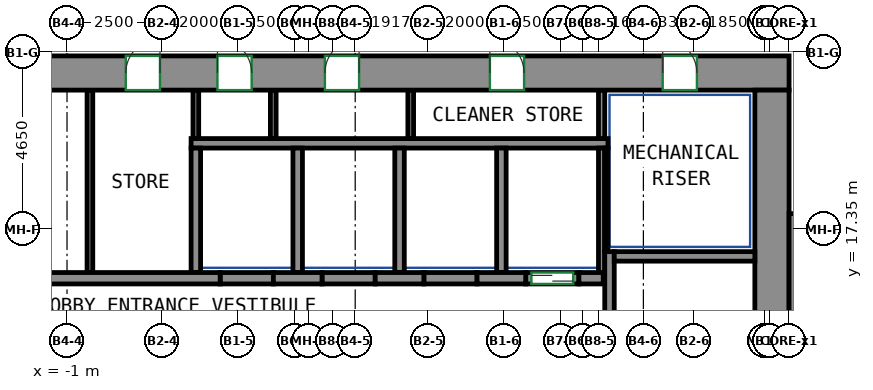
"""IFC4 building model, lengths in metres.
Left out: names, types, materials, properties, quantities, classifications, styles, units other than length and angle.
Written with IfcOpenShell. Run it as: python <this file> out.ifc"""

import sys

from ifc_helpers import new_model, si_unit, direction, frame, frame_2d, origin, place, context, subcontext, project, spatial, rectangle, extrude, source, transform, mapped, element, fill, save


model = new_model("IFC4")
c1 = context("Model", 3, precision=1e-05, world=origin(), true_north=direction((0.0, 1.0)))
c2 = subcontext(c1, "Body", "Model", "MODEL_VIEW")
j1 = project(units=[si_unit("LENGTHUNIT", "METRE"), si_unit("PLANEANGLEUNIT", "RADIAN")], contexts=[c1])
p1 = place(None, origin())
s1 = spatial("IfcSite", under=j1, at=p1, CompositionType="ELEMENT")
p2 = place(p1, origin())
s2 = spatial("IfcBuilding", under=s1, at=p2, CompositionType="ELEMENT")
p3 = place(p2, frame((0.0, 0.0, 171.9)))
s3 = spatial("IfcBuildingStorey", under=s2, at=p3, CompositionType="ELEMENT", Elevation=171.9)
m1 = source(origin(), c2, "Body", "SweptSolid", [
    extrude(rectangle(XDim=33.9, YDim=0.9, at=frame_2d((16.95, 0.0))), origin(), (0.0, 0.0, 1.0), 3.12),
])
p4 = place(p3, frame((-15.9, 21.45, 0.0), z_axis=(0.0, 0.0, 1.0), x_axis=(1.0, 0.0, 0.0)))
e1 = element("IfcWall", 1, at=p4, inside=s3, PredefinedType="SHEAR", context=c2, shape_type="MappedRepresentation", body=[
    mapped(m1, transform((0.0, 0.0, 0.0))),
])
p5 = place(p4, frame((6.731, 0.0, 0.0)))
e2 = element("IfcOpeningElement", 2, at=p5, cuts=e1, PredefinedType="OPENING", context=c2, shape_type="SweptSolid", body=[
    extrude(rectangle(XDim=0.9, YDim=2.1, at=frame_2d((0.45, 1.05))), frame((0.0, 0.46, 0.0), z_axis=(0.0, -1.0, 0.0), x_axis=(1.0, 0.0, 0.0)), (0.0, 0.0, 1.0), 0.92),
])
p6 = place(p4, frame((12.038, 0.0, 0.0)))
e3 = element("IfcOpeningElement", 3, at=p6, cuts=e1, PredefinedType="OPENING", context=c2, shape_type="SweptSolid", body=[
    extrude(rectangle(XDim=0.9, YDim=2.1, at=frame_2d((0.45, 1.05))), frame((0.0, 0.46, 0.0), z_axis=(0.0, -1.0, 0.0), x_axis=(1.0, 0.0, 0.0)), (0.0, 0.0, 1.0), 0.92),
])
p7 = place(p4, frame((16.446, 0.0, 0.0)))
e4 = element("IfcOpeningElement", 4, at=p7, cuts=e1, PredefinedType="OPENING", context=c2, shape_type="SweptSolid", body=[
    extrude(rectangle(XDim=0.9, YDim=2.1, at=frame_2d((0.45, 1.05))), frame((0.0, 0.46, 0.0), z_axis=(0.0, -1.0, 0.0), x_axis=(1.0, 0.0, 0.0)), (0.0, 0.0, 1.0), 0.92),
])
p8 = place(p4, frame((18.858, 0.0, 0.0)))
e5 = element("IfcOpeningElement", 5, at=p8, cuts=e1, PredefinedType="OPENING", context=c2, shape_type="SweptSolid", body=[
    extrude(rectangle(XDim=0.9, YDim=2.1, at=frame_2d((0.45, 1.05))), frame((0.0, 0.46, 0.0), z_axis=(0.0, -1.0, 0.0), x_axis=(1.0, 0.0, 0.0)), (0.0, 0.0, 1.0), 0.92),
])
p9 = place(p4, frame((21.686, 0.0, 0.0)))
e6 = element("IfcOpeningElement", 6, at=p9, cuts=e1, PredefinedType="OPENING", context=c2, shape_type="SweptSolid", body=[
    extrude(rectangle(XDim=0.9, YDim=2.1, at=frame_2d((0.45, 1.05))), frame((0.0, 0.46, 0.0), z_axis=(0.0, -1.0, 0.0), x_axis=(1.0, 0.0, 0.0)), (0.0, 0.0, 1.0), 0.92),
])
p10 = place(p4, frame((26.027, 0.0, 0.0)))
e7 = element("IfcOpeningElement", 7, at=p10, cuts=e1, PredefinedType="OPENING", context=c2, shape_type="SweptSolid", body=[
    extrude(rectangle(XDim=0.9, YDim=2.1, at=frame_2d((0.45, 1.05))), frame((0.0, 0.46, 0.0), z_axis=(0.0, -1.0, 0.0), x_axis=(1.0, 0.0, 0.0)), (0.0, 0.0, 1.0), 0.92),
])
p11 = place(p4, frame((2.425, 0.0, 0.0)))
e8 = element("IfcOpeningElement", 8, at=p11, cuts=e1, PredefinedType="OPENING", context=c2, shape_type="SweptSolid", body=[
    extrude(rectangle(XDim=0.9, YDim=2.1, at=frame_2d((0.45, 1.05))), frame((0.0, 0.46, 0.0), z_axis=(0.0, -1.0, 0.0), x_axis=(1.0, 0.0, 0.0)), (0.0, 0.0, 1.0), 0.92),
])
p12 = place(p4, frame((30.575, 0.0, 0.0)))
e9 = element("IfcOpeningElement", 9, at=p12, cuts=e1, PredefinedType="OPENING", context=c2, shape_type="SweptSolid", body=[
    extrude(rectangle(XDim=0.9, YDim=2.1, at=frame_2d((0.45, 1.05))), frame((0.0, 0.46, 0.0), z_axis=(0.0, -1.0, 0.0), x_axis=(1.0, 0.0, 0.0)), (0.0, 0.0, 1.0), 0.92),
])
m2 = source(origin(), c2, "Body", "SweptSolid", [
    extrude(rectangle(XDim=12.0, YDim=0.9, at=frame_2d((6.0, 0.0))), origin(), (0.0, 0.0, 1.0), 3.12),
])
p13 = place(p3, frame((17.55, 9.0, 0.0), z_axis=(0.0, 0.0, 1.0), x_axis=(0.0, 1.0, 0.0)))
e10 = element("IfcWall", 10, at=p13, inside=s3, PredefinedType="SHEAR", context=c2, shape_type="MappedRepresentation", body=[
    mapped(m2, transform((0.0, 0.0, 0.0))),
])
m3 = source(origin(), c2, "Body", "SweptSolid", [
    extrude(rectangle(XDim=7.75, YDim=0.25, at=frame_2d((3.875, 0.0))), origin(), (0.0, 0.0, 1.0), 3.12),
])
p14 = place(p3, frame((13.275, 9.0, 0.0), z_axis=(0.0, 0.0, 1.0), x_axis=(0.0, 1.0, 0.0)))
e11 = element("IfcWall", 11, at=p14, inside=s3, PredefinedType="SHEAR", context=c2, shape_type="MappedRepresentation", body=[
    mapped(m3, transform((0.0, 0.0, 0.0))),
])
m4 = source(origin(), c2, "Body", "SweptSolid", [
    extrude(rectangle(XDim=3.7, YDim=0.25, at=frame_2d((1.85, 0.0))), origin(), (0.0, 0.0, 1.0), 3.12),
])
p15 = place(p3, frame((13.4, 16.625, 0.0), z_axis=(0.0, 0.0, 1.0), x_axis=(1.0, 0.0, 0.0)))
e12 = element("IfcWall", 12, at=p15, inside=s3, PredefinedType="SHEAR", context=c2, shape_type="MappedRepresentation", body=[
    mapped(m4, transform((0.0, 0.0, 0.0))),
])
m5 = source(origin(), c2, "Body", "SweptSolid", [
    extrude(rectangle(XDim=8.0, YDim=0.35, at=frame_2d((4.0, 0.0))), origin(), (0.0, 0.0, 1.0), 3.12),
])
p16 = place(p3, frame((18.175, 9.75, 0.0), z_axis=(0.0, 0.0, 1.0), x_axis=(0.0, 1.0, 0.0)))
e13 = element("IfcWall", 13, at=p16, inside=s3, PredefinedType="SHEAR", context=c2, shape_type="MappedRepresentation", body=[
    mapped(m5, transform((0.0, 0.0, 0.0))),
])
m6 = source(origin(), c2, "Body", "SweptSolid", [
    extrude(rectangle(XDim=14.04, YDim=0.3, at=frame_2d((7.02, 0.0))), origin(), (0.0, 0.0, 1.0), 3.12),
])
p17 = place(p3, frame((-11.01, 16.05, 0.0), z_axis=(0.0, 0.0, 1.0), x_axis=(1.0, 0.0, 0.0)))
e14 = element("IfcWall", 14, at=p17, inside=s3, PredefinedType="SHEAR", context=c2, shape_type="MappedRepresentation", body=[
    mapped(m6, transform((0.0, 0.0, 0.0))),
])
m7 = source(origin(), c2, "Body", "SweptSolid", [
    extrude(rectangle(XDim=1.28, YDim=0.3, at=frame_2d((0.64, 0.0))), origin(), (0.0, 0.0, 1.0), 3.12),
])
p18 = place(p3, frame((4.43, 16.05, 0.0), z_axis=(0.0, 0.0, 1.0), x_axis=(1.0, 0.0, 0.0)))
e15 = element("IfcWall", 15, at=p18, inside=s3, PredefinedType="SHEAR", context=c2, shape_type="MappedRepresentation", body=[
    mapped(m7, transform((0.0, 0.0, 0.0))),
])
m8 = source(origin(), c2, "Body", "SweptSolid", [
    extrude(rectangle(XDim=1.28, YDim=0.3, at=frame_2d((0.64, 0.0))), origin(), (0.0, 0.0, 1.0), 3.12),
])
p19 = place(p3, frame((7.11, 16.05, 0.0), z_axis=(0.0, 0.0, 1.0), x_axis=(1.0, 0.0, 0.0)))
e16 = element("IfcWall", 16, at=p19, inside=s3, PredefinedType="SHEAR", context=c2, shape_type="MappedRepresentation", body=[
    mapped(m8, transform((0.0, 0.0, 0.0))),
])
p20 = place(p3, frame((9.79, 16.05, 0.0), z_axis=(0.0, 0.0, 1.0), x_axis=(1.0, 0.0, 0.0)))
e17 = element("IfcWall", 17, at=p20, inside=s3, PredefinedType="SHEAR", context=c2, shape_type="MappedRepresentation", body=[
    mapped(m7, transform((0.0, 0.0, 0.0))),
])
m9 = source(origin(), c2, "Body", "SweptSolid", [
    extrude(rectangle(XDim=0.64, YDim=0.3, at=frame_2d((0.32, 0.0))), origin(), (0.0, 0.0, 1.0), 3.12),
])
p21 = place(p3, frame((12.47, 16.05, 0.0), z_axis=(0.0, 0.0, 1.0), x_axis=(1.0, 0.0, 0.0)))
e18 = element("IfcWall", 18, at=p21, inside=s3, PredefinedType="SHEAR", context=c2, shape_type="MappedRepresentation", body=[
    mapped(m9, transform((0.0, 0.0, 0.0))),
])
m10 = source(origin(), c2, "Body", "SweptSolid", [
    extrude(rectangle(XDim=1.4, YDim=0.3, at=frame_2d((0.7, 0.0))), origin(), (0.0, 0.0, 1.0), 3.12),
])
p22 = place(p3, frame((11.07, 16.05, 0.0), z_axis=(0.0, 0.0, 1.0), x_axis=(1.0, 0.0, 0.0)))
e19 = element("IfcWall", 19, at=p22, inside=s3, PredefinedType="PARTITIONING", context=c2, shape_type="MappedRepresentation", body=[
    mapped(m10, transform((0.0, 0.0, 0.0))),
])
p23 = place(p22, frame((0.15, 0.0, 0.0)))
e20 = element("IfcOpeningElement", 20, at=p23, cuts=e19, PredefinedType="OPENING", context=c2, shape_type="SweptSolid", body=[
    extrude(rectangle(XDim=1.1, YDim=2.1, at=frame_2d((0.55, 1.05))), frame((0.0, 0.16, 0.0), z_axis=(0.0, -1.0, 0.0), x_axis=(1.0, 0.0, 0.0)), (0.0, 0.0, 1.0), 0.32),
])
p24 = place(p3, frame((3.03, 16.05, 0.0), z_axis=(0.0, 0.0, 1.0), x_axis=(1.0, 0.0, 0.0)))
e21 = element("IfcWall", 21, at=p24, inside=s3, PredefinedType="PARTITIONING", context=c2, shape_type="MappedRepresentation", body=[
    mapped(m10, transform((0.0, 0.0, 0.0))),
])
m11 = source(origin(), c2, "Body", "SweptSolid", [
    extrude(rectangle(XDim=1.4, YDim=0.3, at=frame_2d((0.7, 0.0))), origin(), (0.0, 0.0, 1.0), 3.12),
])
for number, where, z_axis, x_axis in (
    (22, (5.71, 16.05, 0.0), (0.0, 0.0, 1.0), (1.0, 0.0, 0.0)),
    (23, (8.39, 16.05, 0.0), (0.0, 0.0, 1.0), (1.0, 0.0, 0.0)),
):
    element("IfcWall", number, at=place(p3, frame(where, z_axis=z_axis, x_axis=x_axis)), inside=s3, PredefinedType="PARTITIONING", context=c2, shape_type="MappedRepresentation", body=[
        mapped(m11, transform((0.0, 0.0, 0.0))),
    ])
m12 = source(origin(), c2, "Body", "SweptSolid", [
    extrude(rectangle(XDim=10.97, YDim=0.25, at=frame_2d((5.485, 0.0))), origin(), (0.0, 0.0, 1.0), 3.12),
])
p25 = place(p3, frame((2.265, 19.6, 0.0), z_axis=(0.0, 0.0, 1.0), x_axis=(1.0, 0.0, 0.0)))
e24 = element("IfcWall", 24, at=p25, inside=s3, PredefinedType="PARTITIONING", context=c2, shape_type="MappedRepresentation", body=[
    mapped(m12, transform((0.0, 0.0, 0.0))),
])
m13 = source(origin(), c2, "Body", "SweptSolid", [
    extrude(rectangle(XDim=3.275, YDim=0.165, at=frame_2d((1.638, 0.0))), origin(), (0.0, 0.0, 1.0), 3.12),
])
p26 = place(p3, frame((13.067, 16.2, 0.0), z_axis=(0.0, 0.0, 1.0), x_axis=(0.0, 1.0, 0.0)))
e25 = element("IfcWall", 25, at=p26, inside=s3, PredefinedType="PARTITIONING", context=c2, shape_type="MappedRepresentation", body=[
    mapped(m13, transform((0.0, 0.0, 0.0))),
])
m14 = source(origin(), c2, "Body", "SweptSolid", [
    extrude(rectangle(XDim=1.275, YDim=0.165, at=frame_2d((0.637, 0.0))), origin(), (0.0, 0.0, 1.0), 3.12),
])
p27 = place(p3, frame((13.067, 19.725, 0.0), z_axis=(0.0, 0.0, 1.0), x_axis=(0.0, 1.0, 0.0)))
e26 = element("IfcWall", 26, at=p27, inside=s3, PredefinedType="PARTITIONING", context=c2, shape_type="MappedRepresentation", body=[
    mapped(m14, transform((0.0, 0.0, 0.0))),
])
m15 = source(origin(), c2, "Body", "SweptSolid", [
    extrude(rectangle(XDim=3.275, YDim=0.25, at=frame_2d((1.638, 0.0))), origin(), (0.0, 0.0, 1.0), 3.12),
])
p28 = place(p3, frame((10.43, 16.2, 0.0), z_axis=(0.0, 0.0, 1.0), x_axis=(0.0, 1.0, 0.0)))
e27 = element("IfcWall", 27, at=p28, inside=s3, PredefinedType="PARTITIONING", context=c2, shape_type="MappedRepresentation", body=[
    mapped(m15, transform((0.0, 0.0, 0.0))),
])
m16 = source(origin(), c2, "Body", "SweptSolid", [
    extrude(rectangle(XDim=2.725, YDim=0.085, at=frame_2d((1.363, 0.0))), origin(), (0.0, 0.0, 1.0), 3.12),
])
p29 = place(p3, frame((13.192, 16.75, 0.0), z_axis=(0.0, 0.0, 1.0), x_axis=(0.0, 1.0, 0.0)))
e28 = element("IfcWall", 28, at=p29, inside=s3, PredefinedType="PARTITIONING", context=c2, shape_type="MappedRepresentation", body=[
    mapped(m16, transform((0.0, 0.0, 0.0))),
])
for number, where, z_axis, x_axis in (
    (29, (2.39, 16.2, 0.0), (0.0, 0.0, 1.0), (0.0, 1.0, 0.0)),
    (30, (5.07, 16.2, 0.0), (0.0, 0.0, 1.0), (0.0, 1.0, 0.0)),
    (31, (7.75, 16.2, 0.0), (0.0, 0.0, 1.0), (0.0, 1.0, 0.0)),
):
    element("IfcWall", number, at=place(p3, frame(where, z_axis=z_axis, x_axis=x_axis)), inside=s3, PredefinedType="PARTITIONING", context=c2, shape_type="MappedRepresentation", body=[
        mapped(m15, transform((0.0, 0.0, 0.0))),
    ])
m17 = source(origin(), c2, "Body", "SweptSolid", [
    extrude(rectangle(XDim=4.8, YDim=0.15, at=frame_2d((2.4, 0.0))), origin(), (0.0, 0.0, 1.0), 3.12),
])
p30 = place(p3, frame((-0.397, 16.2, 0.0), z_axis=(0.0, 0.0, 1.0), x_axis=(0.0, 1.0, 0.0)))
e32 = element("IfcWall", 32, at=p30, inside=s3, PredefinedType="PARTITIONING", context=c2, shape_type="MappedRepresentation", body=[
    mapped(m17, transform((0.0, 0.0, 0.0))),
])
m18 = source(origin(), c2, "Body", "SweptSolid", [
    extrude(rectangle(XDim=1.275, YDim=0.15, at=frame_2d((0.637, 0.0))), origin(), (0.0, 0.0, 1.0), 3.12),
])
for number, where, z_axis, x_axis in (
    (33, (2.39, 19.725, 0.0), (0.0, 0.0, 1.0), (0.0, 1.0, 0.0)),
    (34, (4.427, 19.725, 0.0), (0.0, 0.0, 1.0), (0.0, 1.0, 0.0)),
    (35, (8.045, 19.725, 0.0), (0.0, 0.0, 1.0), (0.0, 1.0, 0.0)),
):
    element("IfcWall", number, at=place(p3, frame(where, z_axis=z_axis, x_axis=x_axis)), inside=s3, PredefinedType="PARTITIONING", context=c2, shape_type="MappedRepresentation", body=[
        mapped(m18, transform((0.0, 0.0, 0.0))),
    ])
p31 = place(p23, origin())
e36 = element("IfcDoor", 36, at=p31, inside=s3, OperationType="DOUBLE_DOOR_SLIDING", PredefinedType="DOOR", context=c2, shape_type="SweptSolid", body=[
    extrude(rectangle(XDim=1.1, YDim=2.1, at=frame_2d((0.55, 1.05))), frame((0.0, 0.025, 0.0), z_axis=(0.0, -1.0, 0.0), x_axis=(1.0, 0.0, 0.0)), (0.0, 0.0, 1.0), 0.05),
])
fill(e20, e36)
p32 = place(p7, origin())
e37 = element("IfcDoor", 37, at=p32, inside=s3, OperationType="SINGLE_SWING_RIGHT", PredefinedType="DOOR", context=c2, shape_type="SweptSolid", body=[
    extrude(rectangle(XDim=0.9, YDim=2.1, at=frame_2d((0.45, 1.05))), frame((0.0, -0.305, 0.0), z_axis=(0.0, -1.0, 0.0), x_axis=(1.0, 0.0, 0.0)), (0.0, 0.0, 1.0), 0.05),
])
fill(e4, e37)
p33 = place(p8, origin())
e38 = element("IfcDoor", 38, at=p33, inside=s3, OperationType="SINGLE_SWING_LEFT", PredefinedType="DOOR", context=c2, shape_type="SweptSolid", body=[
    extrude(rectangle(XDim=0.9, YDim=2.1, at=frame_2d((0.45, 1.05))), frame((0.0, -0.305, 0.0), z_axis=(0.0, -1.0, 0.0), x_axis=(1.0, 0.0, 0.0)), (0.0, 0.0, 1.0), 0.05),
])
fill(e5, e38)
p34 = place(p9, origin())
e39 = element("IfcDoor", 39, at=p34, inside=s3, OperationType="SINGLE_SWING_RIGHT", PredefinedType="DOOR", context=c2, shape_type="SweptSolid", body=[
    extrude(rectangle(XDim=0.9, YDim=2.1, at=frame_2d((0.45, 1.05))), frame((0.0, -0.305, 0.0), z_axis=(0.0, -1.0, 0.0), x_axis=(1.0, 0.0, 0.0)), (0.0, 0.0, 1.0), 0.05),
])
fill(e6, e39)
p35 = place(p10, origin())
e40 = element("IfcDoor", 40, at=p35, inside=s3, OperationType="SINGLE_SWING_LEFT", PredefinedType="DOOR", context=c2, shape_type="SweptSolid", body=[
    extrude(rectangle(XDim=0.9, YDim=2.1, at=frame_2d((0.45, 1.05))), frame((0.0, -0.305, 0.0), z_axis=(0.0, -1.0, 0.0), x_axis=(1.0, 0.0, 0.0)), (0.0, 0.0, 1.0), 0.05),
])
fill(e7, e40)
p36 = place(p12, origin())
e41 = element("IfcDoor", 41, at=p36, inside=s3, OperationType="SINGLE_SWING_LEFT", PredefinedType="DOOR", context=c2, shape_type="SweptSolid", body=[
    extrude(rectangle(XDim=0.9, YDim=2.1, at=frame_2d((0.45, 1.05))), frame((0.0, -0.305, 0.0), z_axis=(0.0, -1.0, 0.0), x_axis=(1.0, 0.0, 0.0)), (0.0, 0.0, 1.0), 0.05),
])
fill(e9, e41)
save(model, sys.argv[1])
